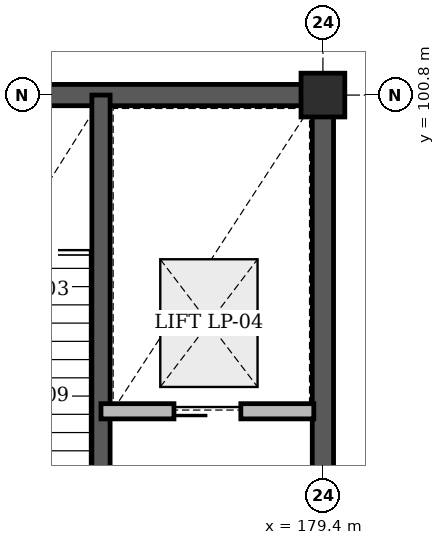
"""IFC4 building model, lengths in metres.
Left out: names, types, materials, properties, quantities, classifications, styles, units other than length and angle.
Written with IfcOpenShell. Run it as: python <this file> out.ifc"""

import sys

from ifc_helpers import new_model, si_unit, direction, frame, frame_2d, origin, origin_2d, place, context, subcontext, project, spatial, rectangle, extrude, element, fill, save


model = new_model("IFC4")
c1 = context("Model", 3, precision=1e-05, world=origin(), true_north=direction((0.0, 1.0)))
c2 = subcontext(c1, "Body", "Model", "MODEL_VIEW")
j1 = project(units=[si_unit("LENGTHUNIT", "METRE"), si_unit("PLANEANGLEUNIT", "RADIAN")], contexts=[c1])
p1 = place(None, origin())
s1 = spatial("IfcSite", under=j1, at=p1, CompositionType="ELEMENT")
p2 = place(p1, origin())
s2 = spatial("IfcBuilding", under=s1, at=p2, CompositionType="ELEMENT")
p3 = place(p2, origin())
s3 = spatial("IfcBuildingStorey", under=s2, at=p3, CompositionType="ELEMENT", Elevation=0.0)
p4 = place(p3, frame((171.425, 100.8, 0.0), z_axis=(0.0, 0.0, 1.0), x_axis=(1.0, 0.0, 0.0)))
e1 = element("IfcWall", 1, at=p4, inside=s3, PredefinedType="SHEAR", context=c2, shape_type="SweptSolid", body=[
    extrude(rectangle(XDim=8.15, YDim=0.35, at=frame_2d((4.075, 0.0))), origin(), (0.0, 0.0, 1.0), 4.48),
])
p5 = place(p3, frame((179.4, 92.4, 0.0), z_axis=(0.0, 0.0, 1.0), x_axis=(0.0, 1.0, 0.0)))
e2 = element("IfcWall", 2, at=p5, inside=s3, PredefinedType="SHEAR", context=c2, shape_type="SweptSolid", body=[
    extrude(rectangle(XDim=8.4, YDim=0.35, at=frame_2d((4.2, 0.0))), origin(), (0.0, 0.0, 1.0), 4.48),
])
p6 = place(p3, frame((179.4, 100.8, 0.0), z_axis=(0.0, 0.0, 1.0), x_axis=(1.0, 0.0, 0.0)))
e3 = element("IfcColumn", 3, at=p6, inside=s3, PredefinedType="COLUMN", context=c2, shape_type="SweptSolid", body=[
    extrude(rectangle(XDim=0.72, YDim=0.72, at=origin_2d()), origin(), (0.0, 0.0, 1.0), 4.8),
])
p7 = place(p3, frame((175.75, 92.4, 0.0), z_axis=(0.0, 0.0, 1.0), x_axis=(0.0, 1.0, 0.0)))
e4 = element("IfcWall", 4, at=p7, inside=s3, PredefinedType="SHEAR", context=c2, shape_type="SweptSolid", body=[
    extrude(rectangle(XDim=8.4, YDim=0.3, at=frame_2d((4.2, 0.0))), origin(), (0.0, 0.0, 1.0), 4.8),
])
p8 = place(p3, frame((175.75, 95.6, 0.0), z_axis=(0.0, 0.0, 1.0), x_axis=(1.0, 0.0, 0.0)))
e5 = element("IfcWall", 5, at=p8, inside=s3, PredefinedType="STANDARD", context=c2, shape_type="SweptSolid", body=[
    extrude(rectangle(XDim=3.5, YDim=0.25, at=frame_2d((1.75, 0.0))), origin(), (0.0, 0.0, 1.0), 4.46),
])
p9 = place(p8, frame((1.2, 0.0, 0.0)))
e6 = element("IfcOpeningElement", 6, at=p9, cuts=e5, PredefinedType="OPENING", context=c2, shape_type="SweptSolid", body=[
    extrude(rectangle(XDim=1.1, YDim=2.2, at=frame_2d((0.55, 1.1))), frame((0.0, 0.135, 0.0), z_axis=(0.0, -1.0, 0.0), x_axis=(1.0, 0.0, 0.0)), (0.0, 0.0, 1.0), 0.27),
])
p10 = place(p9, origin())
e7 = element("IfcDoor", 7, at=p10, inside=s3, OperationType="SLIDING_TO_LEFT", PredefinedType="DOOR", context=c2, shape_type="SweptSolid", body=[
    extrude(rectangle(XDim=1.1, YDim=2.2, at=frame_2d((0.55, 1.1))), frame((0.0, 0.025, 0.0), z_axis=(0.0, -1.0, 0.0), x_axis=(1.0, 0.0, 0.0)), (0.0, 0.0, 1.0), 0.05),
])
fill(e6, e7)
save(model, sys.argv[1])
